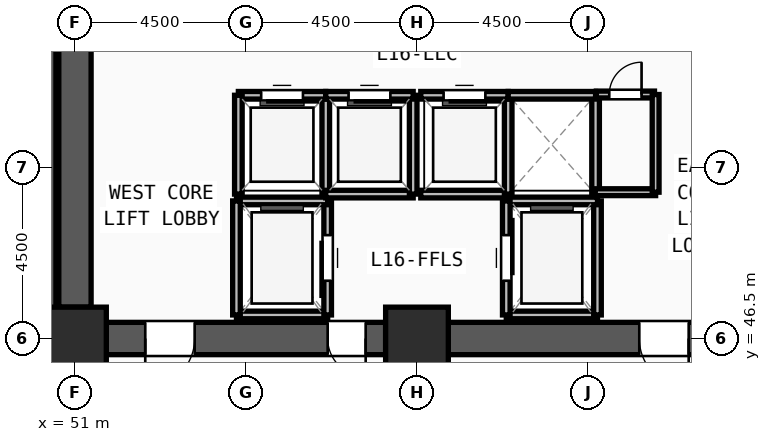
"""IFC4 building model, lengths in metres.
Left out: names, types, materials, properties, quantities, classifications, styles, units other than length and angle.
Written with IfcOpenShell. Run it as: python <this file> out.ifc"""

import sys

from ifc_helpers import new_model, si_unit, direction, frame, frame_2d, origin, origin_2d, place, context, subcontext, project, spatial, rectangle, extrude, source, transform, mapped, element, fill, save


model = new_model("IFC4")
c1 = context("Model", 3, precision=1e-05, world=origin(), true_north=direction((0.0, 1.0)))
c2 = subcontext(c1, "Body", "Model", "MODEL_VIEW")
j1 = project(units=[si_unit("LENGTHUNIT", "METRE"), si_unit("PLANEANGLEUNIT", "RADIAN")], contexts=[c1])
p1 = place(None, origin())
s1 = spatial("IfcSite", under=j1, at=p1, CompositionType="ELEMENT")
p2 = place(p1, origin())
s2 = spatial("IfcBuilding", under=s1, at=p2, CompositionType="ELEMENT")
p3 = place(p2, frame((0.0, 0.0, 63.0)))
s3 = spatial("IfcBuildingStorey", under=s2, at=p3, CompositionType="ELEMENT", Elevation=63.0)
m1 = source(origin(), c2, "Body", "SweptSolid", [
    extrude(rectangle(XDim=1.65, YDim=1.65, at=origin_2d()), origin(), (0.0, 0.0, 1.0), 3.75),
])
for number, where, z_axis, x_axis in (
    (1, (51.0, 46.5, 0.0), (0.0, 0.0, 1.0), (1.0, 0.0, 0.0)),
    (2, (60.0, 46.5, 0.0), (0.0, 0.0, 1.0), (1.0, 0.0, 0.0)),
):
    element("IfcColumn", number, at=place(p3, frame(where, z_axis=z_axis, x_axis=x_axis)), inside=s3, PredefinedType="COLUMN", context=c2, shape_type="MappedRepresentation", body=[
        mapped(m1, transform((0.0, 0.0, 0.0), x_axis=(1.0, 0.0, 0.0), y_axis=(0.0, 1.0, 0.0), z_axis=(0.0, 0.0, 1.0), scale=1.0)),
    ])
p4 = place(p3, frame((68.175, 46.5, 0.0), z_axis=(0.0, 0.0, 1.0), x_axis=(-1.0, 0.0, 0.0)))
e3 = element("IfcWall", 3, at=p4, inside=s3, PredefinedType="SHEAR", context=c2, shape_type="SweptSolid", body=[
    extrude(rectangle(XDim=7.35, YDim=0.85, at=frame_2d((3.675, 0.0))), origin(), (0.0, 0.0, 1.0), 3.57),
])
m2 = source(origin(), c2, "Body", "SweptSolid", [
    extrude(rectangle(XDim=1.3, YDim=2.2, at=frame_2d((0.65, 1.1))), frame((0.0, 0.435, 0.0), z_axis=(0.0, -1.0, 0.0), x_axis=(1.0, 0.0, 0.0)), (0.0, 0.0, 1.0), 0.87),
])
p5 = place(p4, frame((1.025, 0.0, 0.0)))
e4 = element("IfcOpeningElement", 4, at=p5, cuts=e3, PredefinedType="OPENING", context=c2, shape_type="MappedRepresentation", body=[
    mapped(m2, transform((0.0, 0.0, 0.0), x_axis=(1.0, 0.0, 0.0), y_axis=(0.0, 1.0, 0.0), z_axis=(0.0, 0.0, 1.0), scale=1.0)),
])
p6 = place(p3, frame((59.175, 46.5, 0.0), z_axis=(0.0, 0.0, 1.0), x_axis=(-1.0, 0.0, 0.0)))
e5 = element("IfcWall", 5, at=p6, inside=s3, PredefinedType="SHEAR", context=c2, shape_type="SweptSolid", body=[
    extrude(rectangle(XDim=7.35, YDim=0.85, at=frame_2d((3.675, 0.0))), origin(), (0.0, 0.0, 1.0), 3.57),
])
p7 = place(p6, frame((5.025, 0.0, 0.0)))
e6 = element("IfcOpeningElement", 6, at=p7, cuts=e5, PredefinedType="OPENING", context=c2, shape_type="MappedRepresentation", body=[
    mapped(m2, transform((0.0, 0.0, 0.0), x_axis=(1.0, 0.0, 0.0), y_axis=(0.0, 1.0, 0.0), z_axis=(0.0, 0.0, 1.0), scale=1.0)),
])
m3 = source(origin(), c2, "Body", "SweptSolid", [
    extrude(rectangle(XDim=1.0, YDim=2.2, at=frame_2d((0.5, 1.1))), frame((0.0, 0.435, 0.0), z_axis=(0.0, -1.0, 0.0), x_axis=(1.0, 0.0, 0.0)), (0.0, 0.0, 1.0), 0.87),
])
p8 = place(p6, frame((0.525, 0.0, 0.0)))
e7 = element("IfcOpeningElement", 7, at=p8, cuts=e5, PredefinedType="OPENING", context=c2, shape_type="MappedRepresentation", body=[
    mapped(m3, transform((0.0, 0.0, 0.0), x_axis=(1.0, 0.0, 0.0), y_axis=(0.0, 1.0, 0.0), z_axis=(0.0, 0.0, 1.0), scale=1.0)),
])
p9 = place(p3, frame((51.0, 47.325, 0.0), z_axis=(0.0, 0.0, 1.0), x_axis=(0.0, 1.0, 0.0)))
e8 = element("IfcWall", 8, at=p9, inside=s3, PredefinedType="SHEAR", context=c2, shape_type="SweptSolid", body=[
    extrude(rectangle(XDim=13.35, YDim=0.85, at=frame_2d((6.675, 0.0))), origin(), (0.0, 0.0, 1.0), 3.57),
])
p10 = place(p3, frame((50.38, 46.7, 0.0), z_axis=(0.0, 0.0, 1.0), x_axis=(0.0, 1.0, 0.0)))
e9 = element("IfcWall", 9, at=p10, inside=s3, PredefinedType="SOLIDWALL", context=c2, shape_type="SweptSolid", body=[
    extrude(rectangle(XDim=7.82, YDim=0.24, at=frame_2d((3.91, 0.0))), origin(), (0.0, 0.0, 1.0), 3.57),
])
p11 = place(p3, frame((55.25, 47.12, 0.0), z_axis=(0.0, 0.0, 1.0), x_axis=(1.0, 0.0, 0.0)))
e10 = element("IfcWall", 10, at=p11, inside=s3, PredefinedType="SOLIDWALL", context=c2, shape_type="SweptSolid", body=[
    extrude(rectangle(XDim=2.4, YDim=0.2, at=frame_2d((1.2, 0.0))), origin(), (0.0, 0.0, 1.0), 3.57),
])
p12 = place(p3, frame((57.65, 47.12, 0.0), z_axis=(0.0, 0.0, 1.0), x_axis=(0.0, 1.0, 0.0)))
e11 = element("IfcWall", 11, at=p12, inside=s3, PredefinedType="SOLIDWALL", context=c2, shape_type="SweptSolid", body=[
    extrude(rectangle(XDim=3.0, YDim=0.2, at=frame_2d((1.5, 0.0))), origin(), (0.0, 0.0, 1.0), 3.57),
])
m4 = source(origin(), c2, "Body", "SweptSolid", [
    extrude(rectangle(XDim=1.2, YDim=2.3, at=frame_2d((0.6, 1.15))), frame((0.0, 0.11, 0.0), z_axis=(0.0, -1.0, 0.0), x_axis=(1.0, 0.0, 0.0)), (0.0, 0.0, 1.0), 0.22),
])
p13 = place(p12, frame((0.9, 0.0, 0.0)))
e12 = element("IfcOpeningElement", 12, at=p13, cuts=e11, PredefinedType="OPENING", context=c2, shape_type="MappedRepresentation", body=[
    mapped(m4, transform((0.0, 0.0, 0.0), x_axis=(1.0, 0.0, 0.0), y_axis=(0.0, 1.0, 0.0), z_axis=(0.0, 0.0, 1.0), scale=1.0)),
])
p14 = place(p3, frame((57.65, 50.12, 0.0), z_axis=(0.0, 0.0, 1.0), x_axis=(-1.0, 0.0, 0.0)))
e13 = element("IfcWall", 13, at=p14, inside=s3, PredefinedType="SOLIDWALL", context=c2, shape_type="SweptSolid", body=[
    extrude(rectangle(XDim=2.4, YDim=0.2, at=frame_2d((1.2, 0.0))), origin(), (0.0, 0.0, 1.0), 3.57),
])
p15 = place(p3, frame((55.25, 50.12, 0.0), z_axis=(0.0, 0.0, 1.0), x_axis=(0.0, -1.0, 0.0)))
e14 = element("IfcWall", 14, at=p15, inside=s3, PredefinedType="SOLIDWALL", context=c2, shape_type="SweptSolid", body=[
    extrude(rectangle(XDim=3.0, YDim=0.2, at=frame_2d((1.5, 0.0))), origin(), (0.0, 0.0, 1.0), 3.57),
])
p16 = place(p3, frame((62.35, 47.12, 0.0), z_axis=(0.0, 0.0, 1.0), x_axis=(1.0, 0.0, 0.0)))
e15 = element("IfcWall", 15, at=p16, inside=s3, PredefinedType="SOLIDWALL", context=c2, shape_type="SweptSolid", body=[
    extrude(rectangle(XDim=2.4, YDim=0.2, at=frame_2d((1.2, 0.0))), origin(), (0.0, 0.0, 1.0), 3.57),
])
p17 = place(p3, frame((64.75, 47.12, 0.0), z_axis=(0.0, 0.0, 1.0), x_axis=(0.0, 1.0, 0.0)))
e16 = element("IfcWall", 16, at=p17, inside=s3, PredefinedType="SOLIDWALL", context=c2, shape_type="SweptSolid", body=[
    extrude(rectangle(XDim=3.0, YDim=0.2, at=frame_2d((1.5, 0.0))), origin(), (0.0, 0.0, 1.0), 3.57),
])
p18 = place(p3, frame((64.75, 50.12, 0.0), z_axis=(0.0, 0.0, 1.0), x_axis=(-1.0, 0.0, 0.0)))
e17 = element("IfcWall", 17, at=p18, inside=s3, PredefinedType="SOLIDWALL", context=c2, shape_type="SweptSolid", body=[
    extrude(rectangle(XDim=2.4, YDim=0.2, at=frame_2d((1.2, 0.0))), origin(), (0.0, 0.0, 1.0), 3.57),
])
p19 = place(p3, frame((62.35, 50.12, 0.0), z_axis=(0.0, 0.0, 1.0), x_axis=(0.0, -1.0, 0.0)))
e18 = element("IfcWall", 18, at=p19, inside=s3, PredefinedType="SOLIDWALL", context=c2, shape_type="SweptSolid", body=[
    extrude(rectangle(XDim=3.0, YDim=0.2, at=frame_2d((1.5, 0.0))), origin(), (0.0, 0.0, 1.0), 3.57),
])
p20 = place(p19, frame((0.9, 0.0, 0.0)))
e19 = element("IfcOpeningElement", 19, at=p20, cuts=e18, PredefinedType="OPENING", context=c2, shape_type="MappedRepresentation", body=[
    mapped(m4, transform((0.0, 0.0, 0.0), x_axis=(1.0, 0.0, 0.0), y_axis=(0.0, 1.0, 0.0), z_axis=(0.0, 0.0, 1.0), scale=1.0)),
])
p21 = place(p3, frame((57.6, 50.3, 0.0), z_axis=(0.0, 0.0, 1.0), x_axis=(0.0, 1.0, 0.0)))
e20 = element("IfcWall", 20, at=p21, inside=s3, PredefinedType="SOLIDWALL", context=c2, shape_type="SweptSolid", body=[
    extrude(rectangle(XDim=2.6, YDim=0.2, at=frame_2d((1.3, 0.0))), origin(), (0.0, 0.0, 1.0), 3.57),
])
p22 = place(p3, frame((57.6, 52.9, 0.0), z_axis=(0.0, 0.0, 1.0), x_axis=(-1.0, 0.0, 0.0)))
e21 = element("IfcWall", 21, at=p22, inside=s3, PredefinedType="SOLIDWALL", context=c2, shape_type="SweptSolid", body=[
    extrude(rectangle(XDim=2.3, YDim=0.2, at=frame_2d((1.15, 0.0))), origin(), (0.0, 0.0, 1.0), 3.57),
])
m5 = source(origin(), c2, "Body", "SweptSolid", [
    extrude(rectangle(XDim=1.1, YDim=2.2, at=frame_2d((0.55, 1.1))), frame((0.0, 0.11, 0.0), z_axis=(0.0, -1.0, 0.0), x_axis=(1.0, 0.0, 0.0)), (0.0, 0.0, 1.0), 0.22),
])
p23 = place(p22, frame((0.6, 0.0, 0.0)))
e22 = element("IfcOpeningElement", 22, at=p23, cuts=e21, PredefinedType="OPENING", context=c2, shape_type="MappedRepresentation", body=[
    mapped(m5, transform((0.0, 0.0, 0.0), x_axis=(1.0, 0.0, 0.0), y_axis=(0.0, 1.0, 0.0), z_axis=(0.0, 0.0, 1.0), scale=1.0)),
])
p24 = place(p3, frame((55.3, 52.9, 0.0), z_axis=(0.0, 0.0, 1.0), x_axis=(0.0, -1.0, 0.0)))
e23 = element("IfcWall", 23, at=p24, inside=s3, PredefinedType="SOLIDWALL", context=c2, shape_type="SweptSolid", body=[
    extrude(rectangle(XDim=2.6, YDim=0.2, at=frame_2d((1.3, 0.0))), origin(), (0.0, 0.0, 1.0), 3.57),
])
p25 = place(p3, frame((57.6, 50.3, 0.0), z_axis=(0.0, 0.0, 1.0), x_axis=(1.0, 0.0, 0.0)))
e24 = element("IfcWall", 24, at=p25, inside=s3, PredefinedType="SOLIDWALL", context=c2, shape_type="SweptSolid", body=[
    extrude(rectangle(XDim=2.3, YDim=0.2, at=frame_2d((1.15, 0.0))), origin(), (0.0, 0.0, 1.0), 3.57),
])
p26 = place(p3, frame((59.9, 50.3, 0.0), z_axis=(0.0, 0.0, 1.0), x_axis=(0.0, 1.0, 0.0)))
e25 = element("IfcWall", 25, at=p26, inside=s3, PredefinedType="SOLIDWALL", context=c2, shape_type="SweptSolid", body=[
    extrude(rectangle(XDim=2.6, YDim=0.2, at=frame_2d((1.3, 0.0))), origin(), (0.0, 0.0, 1.0), 3.57),
])
p27 = place(p3, frame((59.9, 52.9, 0.0), z_axis=(0.0, 0.0, 1.0), x_axis=(-1.0, 0.0, 0.0)))
e26 = element("IfcWall", 26, at=p27, inside=s3, PredefinedType="SOLIDWALL", context=c2, shape_type="SweptSolid", body=[
    extrude(rectangle(XDim=2.3, YDim=0.2, at=frame_2d((1.15, 0.0))), origin(), (0.0, 0.0, 1.0), 3.57),
])
p28 = place(p27, frame((0.6, 0.0, 0.0)))
e27 = element("IfcOpeningElement", 27, at=p28, cuts=e26, PredefinedType="OPENING", context=c2, shape_type="MappedRepresentation", body=[
    mapped(m5, transform((0.0, 0.0, 0.0), x_axis=(1.0, 0.0, 0.0), y_axis=(0.0, 1.0, 0.0), z_axis=(0.0, 0.0, 1.0), scale=1.0)),
])
p29 = place(p3, frame((60.1, 50.3, 0.0), z_axis=(0.0, 0.0, 1.0), x_axis=(1.0, 0.0, 0.0)))
e28 = element("IfcWall", 28, at=p29, inside=s3, PredefinedType="SOLIDWALL", context=c2, shape_type="SweptSolid", body=[
    extrude(rectangle(XDim=2.3, YDim=0.2, at=frame_2d((1.15, 0.0))), origin(), (0.0, 0.0, 1.0), 3.57),
])
p30 = place(p3, frame((62.4, 50.3, 0.0), z_axis=(0.0, 0.0, 1.0), x_axis=(0.0, 1.0, 0.0)))
e29 = element("IfcWall", 29, at=p30, inside=s3, PredefinedType="SOLIDWALL", context=c2, shape_type="SweptSolid", body=[
    extrude(rectangle(XDim=2.6, YDim=0.2, at=frame_2d((1.3, 0.0))), origin(), (0.0, 0.0, 1.0), 3.57),
])
p31 = place(p3, frame((62.4, 52.9, 0.0), z_axis=(0.0, 0.0, 1.0), x_axis=(-1.0, 0.0, 0.0)))
e30 = element("IfcWall", 30, at=p31, inside=s3, PredefinedType="SOLIDWALL", context=c2, shape_type="SweptSolid", body=[
    extrude(rectangle(XDim=2.3, YDim=0.2, at=frame_2d((1.15, 0.0))), origin(), (0.0, 0.0, 1.0), 3.57),
])
p32 = place(p31, frame((0.6, 0.0, 0.0)))
e31 = element("IfcOpeningElement", 31, at=p32, cuts=e30, PredefinedType="OPENING", context=c2, shape_type="MappedRepresentation", body=[
    mapped(m5, transform((0.0, 0.0, 0.0), x_axis=(1.0, 0.0, 0.0), y_axis=(0.0, 1.0, 0.0), z_axis=(0.0, 0.0, 1.0), scale=1.0)),
])
p33 = place(p3, frame((64.7, 50.3, 0.0), z_axis=(0.0, 0.0, 1.0), x_axis=(0.0, 1.0, 0.0)))
e32 = element("IfcWall", 32, at=p33, inside=s3, PredefinedType="SOLIDWALL", context=c2, shape_type="SweptSolid", body=[
    extrude(rectangle(XDim=2.6, YDim=0.2, at=frame_2d((1.3, 0.0))), origin(), (0.0, 0.0, 1.0), 3.57),
])
p34 = place(p3, frame((64.7, 52.9, 0.0), z_axis=(0.0, 0.0, 1.0), x_axis=(-1.0, 0.0, 0.0)))
e33 = element("IfcWall", 33, at=p34, inside=s3, PredefinedType="SOLIDWALL", context=c2, shape_type="SweptSolid", body=[
    extrude(rectangle(XDim=2.3, YDim=0.2, at=frame_2d((1.15, 0.0))), origin(), (0.0, 0.0, 1.0), 3.57),
])
p35 = place(p3, frame((64.72, 52.92, 0.0), z_axis=(0.0, 0.0, 1.0), x_axis=(1.0, 0.0, 0.0)))
e34 = element("IfcWall", 34, at=p35, inside=s3, PredefinedType="PARTITIONING", context=c2, shape_type="SweptSolid", body=[
    extrude(rectangle(XDim=1.53, YDim=0.18, at=frame_2d((0.765, 0.0))), origin(), (0.0, 0.0, 1.0), 3.57),
])
m6 = source(origin(), c2, "Body", "SweptSolid", [
    extrude(rectangle(XDim=0.85, YDim=2.1, at=frame_2d((0.425, 1.05))), frame((0.0, 0.1, 0.0), z_axis=(0.0, -1.0, 0.0), x_axis=(1.0, 0.0, 0.0)), (0.0, 0.0, 1.0), 0.2),
])
p36 = place(p35, frame((0.34, 0.0, 0.0)))
e35 = element("IfcOpeningElement", 35, at=p36, cuts=e34, PredefinedType="OPENING", context=c2, shape_type="MappedRepresentation", body=[
    mapped(m6, transform((0.0, 0.0, 0.0), x_axis=(1.0, 0.0, 0.0), y_axis=(0.0, 1.0, 0.0), z_axis=(0.0, 0.0, 1.0), scale=1.0)),
])
p37 = place(p3, frame((64.69, 50.35, 0.0), z_axis=(0.0, 0.0, 1.0), x_axis=(1.0, 0.0, 0.0)))
e36 = element("IfcWall", 36, at=p37, inside=s3, PredefinedType="PARTITIONING", context=c2, shape_type="SweptSolid", body=[
    extrude(rectangle(XDim=1.59, YDim=0.18, at=frame_2d((0.795, 0.0))), origin(), (0.0, 0.0, 1.0), 3.57),
])
p38 = place(p3, frame((66.28, 50.35, 0.0), z_axis=(0.0, 0.0, 1.0), x_axis=(0.0, 1.0, 0.0)))
e37 = element("IfcWall", 37, at=p38, inside=s3, PredefinedType="PARTITIONING", context=c2, shape_type="SweptSolid", body=[
    extrude(rectangle(XDim=2.57, YDim=0.18, at=frame_2d((1.285, 0.0))), origin(), (0.0, 0.0, 1.0), 3.57),
])
m7 = source(origin(), c2, "Body", "SweptSolid", [
    extrude(rectangle(XDim=1.3, YDim=2.2, at=frame_2d((0.65, 1.1))), frame((0.0, 0.025, 0.0), z_axis=(0.0, -1.0, 0.0), x_axis=(1.0, 0.0, 0.0)), (0.0, 0.0, 1.0), 0.05),
])
p39 = place(p7, origin())
e38 = element("IfcDoor", 38, at=p39, inside=s3, OperationType="SINGLE_SWING_RIGHT", PredefinedType="DOOR", context=c2, shape_type="MappedRepresentation", body=[
    mapped(m7, transform((0.0, 0.0, 0.0), x_axis=(1.0, 0.0, 0.0), y_axis=(0.0, 1.0, 0.0), z_axis=(0.0, 0.0, 1.0), scale=1.0)),
])
fill(e6, e38)
m8 = source(origin(), c2, "Body", "SweptSolid", [
    extrude(rectangle(XDim=1.0, YDim=2.2, at=frame_2d((0.5, 1.1))), frame((0.0, 0.025, 0.0), z_axis=(0.0, -1.0, 0.0), x_axis=(1.0, 0.0, 0.0)), (0.0, 0.0, 1.0), 0.05),
])
p40 = place(p8, origin())
e39 = element("IfcDoor", 39, at=p40, inside=s3, OperationType="SINGLE_SWING_LEFT", PredefinedType="DOOR", context=c2, shape_type="MappedRepresentation", body=[
    mapped(m8, transform((0.0, 0.0, 0.0), x_axis=(1.0, 0.0, 0.0), y_axis=(0.0, 1.0, 0.0), z_axis=(0.0, 0.0, 1.0), scale=1.0)),
])
fill(e7, e39)
p41 = place(p5, origin())
e40 = element("IfcDoor", 40, at=p41, inside=s3, OperationType="SINGLE_SWING_LEFT", PredefinedType="DOOR", context=c2, shape_type="MappedRepresentation", body=[
    mapped(m7, transform((0.0, 0.0, 0.0), x_axis=(1.0, 0.0, 0.0), y_axis=(0.0, 1.0, 0.0), z_axis=(0.0, 0.0, 1.0), scale=1.0)),
])
fill(e4, e40)
m9 = source(origin(), c2, "Body", "SweptSolid", [
    extrude(rectangle(XDim=1.2, YDim=2.3, at=frame_2d((0.6, 1.15))), frame((0.0, 0.025, 0.0), z_axis=(0.0, -1.0, 0.0), x_axis=(1.0, 0.0, 0.0)), (0.0, 0.0, 1.0), 0.05),
])
p42 = place(p13, origin())
e41 = element("IfcDoor", 41, at=p42, inside=s3, OperationType="SLIDING_TO_LEFT", PredefinedType="DOOR", context=c2, shape_type="MappedRepresentation", body=[
    mapped(m9, transform((0.0, 0.0, 0.0), x_axis=(1.0, 0.0, 0.0), y_axis=(0.0, 1.0, 0.0), z_axis=(0.0, 0.0, 1.0), scale=1.0)),
])
fill(e12, e41)
p43 = place(p20, origin())
e42 = element("IfcDoor", 42, at=p43, inside=s3, OperationType="SLIDING_TO_LEFT", PredefinedType="DOOR", context=c2, shape_type="MappedRepresentation", body=[
    mapped(m9, transform((0.0, 0.0, 0.0), x_axis=(1.0, 0.0, 0.0), y_axis=(0.0, 1.0, 0.0), z_axis=(0.0, 0.0, 1.0), scale=1.0)),
])
fill(e19, e42)
m10 = source(origin(), c2, "Body", "SweptSolid", [
    extrude(rectangle(XDim=1.1, YDim=2.2, at=frame_2d((0.55, 1.1))), frame((0.0, 0.025, 0.0), z_axis=(0.0, -1.0, 0.0), x_axis=(1.0, 0.0, 0.0)), (0.0, 0.0, 1.0), 0.05),
])
p44 = place(p23, origin())
e43 = element("IfcDoor", 43, at=p44, inside=s3, OperationType="SLIDING_TO_LEFT", PredefinedType="DOOR", context=c2, shape_type="MappedRepresentation", body=[
    mapped(m10, transform((0.0, 0.0, 0.0), x_axis=(1.0, 0.0, 0.0), y_axis=(0.0, 1.0, 0.0), z_axis=(0.0, 0.0, 1.0), scale=1.0)),
])
fill(e22, e43)
p45 = place(p28, origin())
e44 = element("IfcDoor", 44, at=p45, inside=s3, OperationType="SLIDING_TO_LEFT", PredefinedType="DOOR", context=c2, shape_type="MappedRepresentation", body=[
    mapped(m10, transform((0.0, 0.0, 0.0), x_axis=(1.0, 0.0, 0.0), y_axis=(0.0, 1.0, 0.0), z_axis=(0.0, 0.0, 1.0), scale=1.0)),
])
fill(e27, e44)
p46 = place(p32, origin())
e45 = element("IfcDoor", 45, at=p46, inside=s3, OperationType="SLIDING_TO_LEFT", PredefinedType="DOOR", context=c2, shape_type="MappedRepresentation", body=[
    mapped(m10, transform((0.0, 0.0, 0.0), x_axis=(1.0, 0.0, 0.0), y_axis=(0.0, 1.0, 0.0), z_axis=(0.0, 0.0, 1.0), scale=1.0)),
])
fill(e31, e45)
m11 = source(origin(), c2, "Body", "SweptSolid", [
    extrude(rectangle(XDim=0.85, YDim=2.1, at=frame_2d((0.425, 1.05))), frame((0.0, 0.025, 0.0), z_axis=(0.0, -1.0, 0.0), x_axis=(1.0, 0.0, 0.0)), (0.0, 0.0, 1.0), 0.05),
])
p47 = place(p36, origin())
e46 = element("IfcDoor", 46, at=p47, inside=s3, OperationType="SINGLE_SWING_RIGHT", PredefinedType="DOOR", context=c2, shape_type="MappedRepresentation", body=[
    mapped(m11, transform((0.0, 0.0, 0.0), x_axis=(1.0, 0.0, 0.0), y_axis=(0.0, 1.0, 0.0), z_axis=(0.0, 0.0, 1.0), scale=1.0)),
])
fill(e35, e46)
save(model, sys.argv[1])
